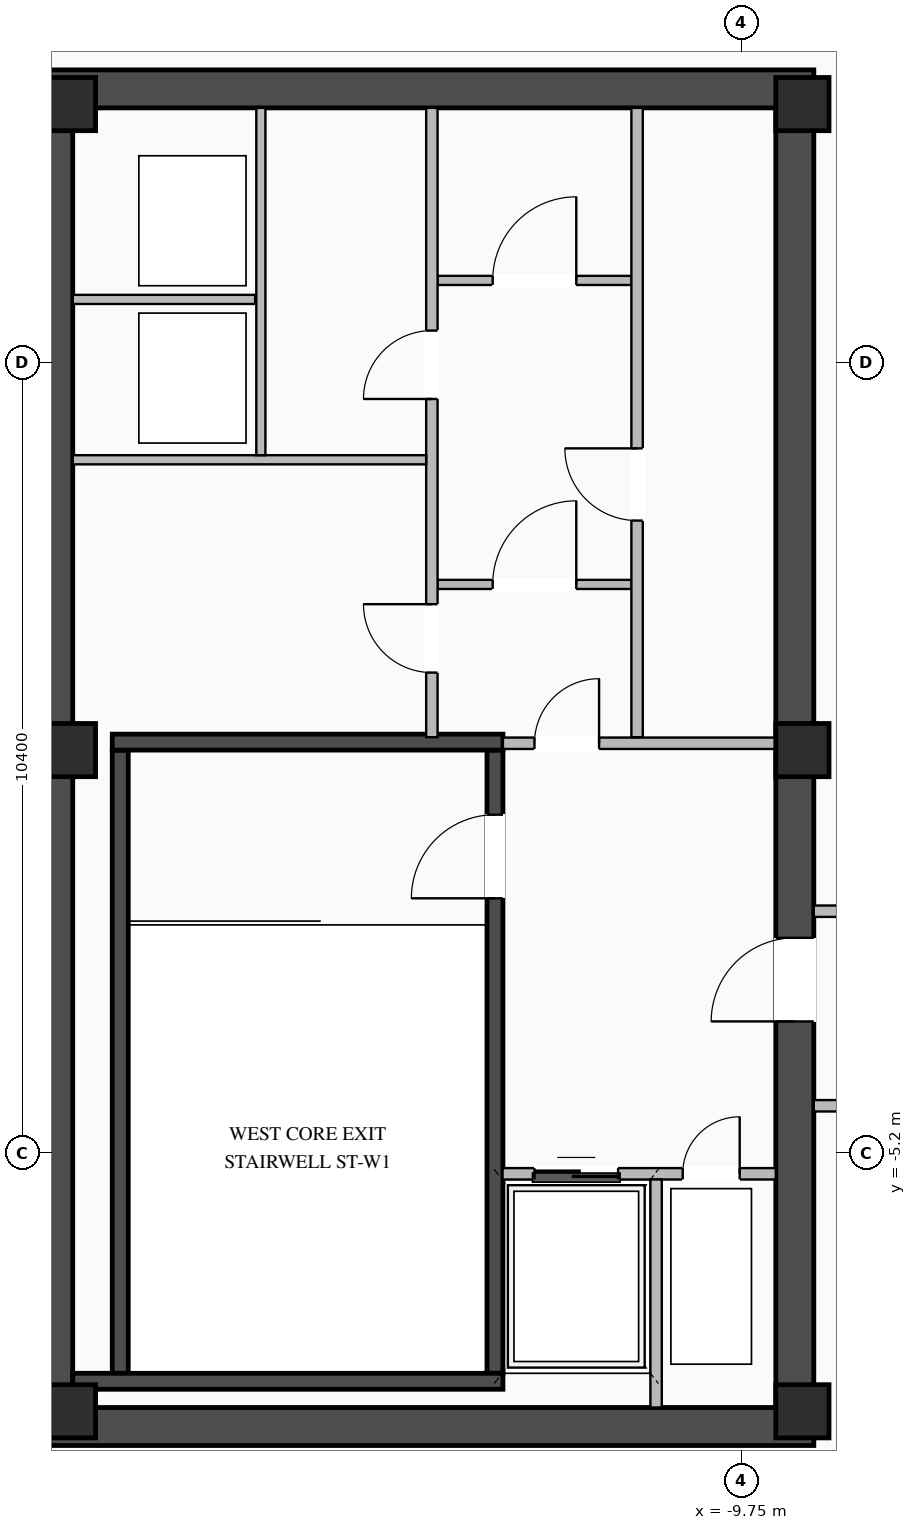
"""IFC4 building model, lengths in metres.
Left out: names, types, materials, properties, quantities, classifications, styles, units other than length and angle.
Written with IfcOpenShell. Run it as: python <this file> out.ifc"""

import sys

from ifc_helpers import new_model, si_unit, direction, frame, frame_2d, origin, origin_2d, place, context, subcontext, project, spatial, rectangle, extrude, element, fill, save


model = new_model("IFC4")
c1 = context("Model", 3, precision=1e-05, world=origin(), true_north=direction((0.0, 1.0)))
c2 = subcontext(c1, "Body", "Model", "MODEL_VIEW")
j1 = project(units=[si_unit("LENGTHUNIT", "METRE"), si_unit("PLANEANGLEUNIT", "RADIAN")], contexts=[c1])
p1 = place(None, origin())
s1 = spatial("IfcSite", under=j1, at=p1, CompositionType="ELEMENT")
p2 = place(p1, origin())
s2 = spatial("IfcBuilding", under=s1, at=p2, CompositionType="ELEMENT")
p3 = place(p2, frame((0.0, 0.0, 308.55)))
s3 = spatial("IfcBuildingStorey", under=s2, at=p3, CompositionType="ELEMENT", Elevation=308.55)
for number, where, z_axis, x_axis in (
    (1, (-19.05, -8.8, 0.0), (0.0, 0.0, 1.0), (1.0, 0.0, 0.0)),
    (2, (-19.05, 8.8, 0.0), (0.0, 0.0, 1.0), (1.0, 0.0, 0.0)),
):
    element("IfcWall", number, at=place(p3, frame(where, z_axis=z_axis, x_axis=x_axis)), inside=s3, PredefinedType="SHEAR", context=c2, shape_type="SweptSolid", body=[
        extrude(rectangle(XDim=10.25, YDim=0.5, at=frame_2d((5.125, 0.0))), origin(), (0.0, 0.0, 1.0), 3.71),
    ])
p4 = place(p3, frame((-18.8, -8.55, 0.0), z_axis=(0.0, 0.0, 1.0), x_axis=(0.0, 1.0, 0.0)))
e3 = element("IfcWall", 3, at=p4, inside=s3, PredefinedType="SHEAR", context=c2, shape_type="SweptSolid", body=[
    extrude(rectangle(XDim=17.1, YDim=0.5, at=frame_2d((8.55, 0.0))), origin(), (0.0, 0.0, 1.0), 3.71),
])
p5 = place(p3, frame((-9.05, -8.55, 0.0), z_axis=(0.0, 0.0, 1.0), x_axis=(0.0, 1.0, 0.0)))
e4 = element("IfcWall", 4, at=p5, inside=s3, PredefinedType="SHEAR", context=c2, shape_type="SweptSolid", body=[
    extrude(rectangle(XDim=17.1, YDim=0.5, at=frame_2d((8.55, 0.0))), origin(), (0.0, 0.0, 1.0), 3.71),
])
p6 = place(p5, frame((5.08, 0.0, 0.0)))
e5 = element("IfcOpeningElement", 5, at=p6, cuts=e4, PredefinedType="OPENING", context=c2, shape_type="SweptSolid", body=[
    extrude(rectangle(XDim=1.1, YDim=2.08, at=frame_2d((0.55, 1.04))), frame((0.0, 0.26, 0.0), z_axis=(0.0, -1.0, 0.0), x_axis=(1.0, 0.0, 0.0)), (0.0, 0.0, 1.0), 0.52),
])
p7 = place(p3, frame((-12.995, -8.1, 0.0), z_axis=(0.0, 0.0, 1.0), x_axis=(0.0, 1.0, 0.0)))
e6 = element("IfcWall", 6, at=p7, inside=s3, PredefinedType="SHEAR", context=c2, shape_type="SweptSolid", body=[
    extrude(rectangle(XDim=8.2, YDim=0.21, at=frame_2d((4.1, 0.0))), origin(), (0.0, 0.0, 1.0), 3.71),
])
p8 = place(p7, frame((6.25, 0.0, 0.0)))
e7 = element("IfcOpeningElement", 7, at=p8, cuts=e6, PredefinedType="OPENING", context=c2, shape_type="SweptSolid", body=[
    extrude(rectangle(XDim=1.1, YDim=2.15, at=frame_2d((0.55, 1.075))), frame((0.0, 0.115, 0.0), z_axis=(0.0, -1.0, 0.0), x_axis=(1.0, 0.0, 0.0)), (0.0, 0.0, 1.0), 0.23),
])
p9 = place(p3, frame((-17.925, -8.1, 0.0), z_axis=(0.0, 0.0, 1.0), x_axis=(0.0, 1.0, 0.0)))
e8 = element("IfcWall", 8, at=p9, inside=s3, PredefinedType="SHEAR", context=c2, shape_type="SweptSolid", body=[
    extrude(rectangle(XDim=8.2, YDim=0.21, at=frame_2d((4.1, 0.0))), origin(), (0.0, 0.0, 1.0), 3.71),
])
p10 = place(p3, frame((-18.55, -8.205, 0.0), z_axis=(0.0, 0.0, 1.0), x_axis=(1.0, 0.0, 0.0)))
e9 = element("IfcWall", 9, at=p10, inside=s3, PredefinedType="SHEAR", context=c2, shape_type="SweptSolid", body=[
    extrude(rectangle(XDim=5.66, YDim=0.21, at=frame_2d((2.83, 0.0))), origin(), (0.0, 0.0, 1.0), 3.71),
])
p11 = place(p3, frame((-12.89, 0.205, 0.0), z_axis=(0.0, 0.0, 1.0), x_axis=(-1.0, 0.0, 0.0)))
e10 = element("IfcWall", 10, at=p11, inside=s3, PredefinedType="SHEAR", context=c2, shape_type="SweptSolid", body=[
    extrude(rectangle(XDim=5.14, YDim=0.21, at=frame_2d((2.57, 0.0))), origin(), (0.0, 0.0, 1.0), 3.71),
])
for number, where, z_axis, x_axis in (
    (11, (-8.95, -8.6, 0.0), (0.0, 0.0, 1.0), (1.0, 0.0, 0.0)),
    (12, (-8.95, 0.1, 0.0), (0.0, 0.0, 1.0), (1.0, 0.0, 0.0)),
    (13, (-8.95, 8.6, 0.0), (0.0, 0.0, 1.0), (1.0, 0.0, 0.0)),
    (14, (-18.6, -8.6, 0.0), (0.0, 0.0, 1.0), (1.0, 0.0, 0.0)),
    (15, (-18.6, 0.1, 0.0), (0.0, 0.0, 1.0), (1.0, 0.0, 0.0)),
    (16, (-18.6, 8.6, 0.0), (0.0, 0.0, 1.0), (1.0, 0.0, 0.0)),
):
    element("IfcColumn", number, at=place(p3, frame(where, z_axis=z_axis, x_axis=x_axis)), inside=s3, PredefinedType="COLUMN", context=c2, shape_type="SweptSolid", body=[
        extrude(rectangle(XDim=0.7, YDim=0.7, at=origin_2d()), origin(), (0.0, 0.0, 1.0), 3.95),
    ])
p12 = place(p3, frame((-12.895, -5.475, 0.0), z_axis=(0.0, 0.0, 1.0), x_axis=(1.0, 0.0, 0.0)))
e17 = element("IfcWall", 17, at=p12, inside=s3, PredefinedType="STANDARD", context=c2, shape_type="SweptSolid", body=[
    extrude(rectangle(XDim=3.595, YDim=0.15, at=frame_2d((1.797, 0.0))), origin(), (0.0, 0.0, 1.0), 3.69),
])
p13 = place(p12, frame((0.42, 0.0, 0.0)))
e18 = element("IfcOpeningElement", 18, at=p13, cuts=e17, PredefinedType="OPENING", context=c2, shape_type="SweptSolid", body=[
    extrude(rectangle(XDim=1.1, YDim=2.15, at=frame_2d((0.55, 1.075))), frame((0.0, 0.085, 0.0), z_axis=(0.0, -1.0, 0.0), x_axis=(1.0, 0.0, 0.0)), (0.0, 0.0, 1.0), 0.17),
])
p14 = place(p12, frame((2.37, 0.0, 0.0)))
e19 = element("IfcOpeningElement", 19, at=p14, cuts=e17, PredefinedType="OPENING", context=c2, shape_type="SweptSolid", body=[
    extrude(rectangle(XDim=0.75, YDim=2.05, at=frame_2d((0.375, 1.025))), frame((0.0, 0.085, 0.0), z_axis=(0.0, -1.0, 0.0), x_axis=(1.0, 0.0, 0.0)), (0.0, 0.0, 1.0), 0.17),
])
p15 = place(p3, frame((-10.875, -8.55, 0.0), z_axis=(0.0, 0.0, 1.0), x_axis=(0.0, 1.0, 0.0)))
e20 = element("IfcWall", 20, at=p15, inside=s3, PredefinedType="STANDARD", context=c2, shape_type="SweptSolid", body=[
    extrude(rectangle(XDim=3.0, YDim=0.15, at=frame_2d((1.5, 0.0))), origin(), (0.0, 0.0, 1.0), 3.69),
])
p16 = place(p3, frame((-12.89, 0.19, 0.0), z_axis=(0.0, 0.0, 1.0), x_axis=(1.0, 0.0, 0.0)))
e21 = element("IfcWall", 21, at=p16, inside=s3, PredefinedType="STANDARD", context=c2, shape_type="SweptSolid", body=[
    extrude(rectangle(XDim=3.59, YDim=0.15, at=frame_2d((1.795, 0.0))), origin(), (0.0, 0.0, 1.0), 3.185),
])
p17 = place(p16, frame((0.415, 0.0, 0.0)))
e22 = element("IfcOpeningElement", 22, at=p17, cuts=e21, PredefinedType="OPENING", context=c2, shape_type="SweptSolid", body=[
    extrude(rectangle(XDim=0.85, YDim=2.04, at=frame_2d((0.425, 1.02))), frame((0.0, 0.085, 0.0), z_axis=(0.0, -1.0, 0.0), x_axis=(1.0, 0.0, 0.0)), (0.0, 0.0, 1.0), 0.17),
])
p18 = place(p3, frame((-13.75, 2.28, 0.0), z_axis=(0.0, 0.0, 1.0), x_axis=(1.0, 0.0, 0.0)))
e23 = element("IfcWall", 23, at=p18, inside=s3, PredefinedType="STANDARD", context=c2, shape_type="SweptSolid", body=[
    extrude(rectangle(XDim=2.55, YDim=0.12, at=frame_2d((1.275, 0.0))), origin(), (0.0, 0.0, 1.0), 3.69),
])
p19 = place(p18, frame((0.725, 0.0, 0.0)))
e24 = element("IfcOpeningElement", 24, at=p19, cuts=e23, PredefinedType="OPENING", context=c2, shape_type="SweptSolid", body=[
    extrude(rectangle(XDim=1.1, YDim=2.1, at=frame_2d((0.55, 1.05))), frame((0.0, 0.07, 0.0), z_axis=(0.0, -1.0, 0.0), x_axis=(1.0, 0.0, 0.0)), (0.0, 0.0, 1.0), 0.14),
])
p20 = place(p3, frame((-13.75, 6.28, 0.0), z_axis=(0.0, 0.0, 1.0), x_axis=(1.0, 0.0, 0.0)))
e25 = element("IfcWall", 25, at=p20, inside=s3, PredefinedType="STANDARD", context=c2, shape_type="SweptSolid", body=[
    extrude(rectangle(XDim=2.55, YDim=0.12, at=frame_2d((1.275, 0.0))), origin(), (0.0, 0.0, 1.0), 3.69),
])
p21 = place(p20, frame((0.725, 0.0, 0.0)))
e26 = element("IfcOpeningElement", 26, at=p21, cuts=e25, PredefinedType="OPENING", context=c2, shape_type="SweptSolid", body=[
    extrude(rectangle(XDim=1.1, YDim=2.1, at=frame_2d((0.55, 1.05))), frame((0.0, 0.07, 0.0), z_axis=(0.0, -1.0, 0.0), x_axis=(1.0, 0.0, 0.0)), (0.0, 0.0, 1.0), 0.14),
])
p22 = place(p3, frame((-11.125, 0.27, 0.0), z_axis=(0.0, 0.0, 1.0), x_axis=(0.0, 1.0, 0.0)))
e27 = element("IfcWall", 27, at=p22, inside=s3, PredefinedType="STANDARD", context=c2, shape_type="SweptSolid", body=[
    extrude(rectangle(XDim=8.28, YDim=0.15, at=frame_2d((4.14, 0.0))), origin(), (0.0, 0.0, 1.0), 3.69),
])
p23 = place(p22, frame((2.85, 0.0, 0.0)))
e28 = element("IfcOpeningElement", 28, at=p23, cuts=e27, PredefinedType="OPENING", context=c2, shape_type="SweptSolid", body=[
    extrude(rectangle(XDim=0.95, YDim=2.05, at=frame_2d((0.475, 1.025))), frame((0.0, 0.085, 0.0), z_axis=(0.0, -1.0, 0.0), x_axis=(1.0, 0.0, 0.0)), (0.0, 0.0, 1.0), 0.17),
])
p24 = place(p3, frame((-13.825, 0.27, 0.0), z_axis=(0.0, 0.0, 1.0), x_axis=(0.0, 1.0, 0.0)))
e29 = element("IfcWall", 29, at=p24, inside=s3, PredefinedType="STANDARD", context=c2, shape_type="SweptSolid", body=[
    extrude(rectangle(XDim=8.28, YDim=0.15, at=frame_2d((4.14, 0.0))), origin(), (0.0, 0.0, 1.0), 3.69),
])
p25 = place(p24, frame((4.45, 0.0, 0.0)))
e30 = element("IfcOpeningElement", 30, at=p25, cuts=e29, PredefinedType="OPENING", context=c2, shape_type="SweptSolid", body=[
    extrude(rectangle(XDim=0.9, YDim=2.05, at=frame_2d((0.45, 1.025))), frame((0.0, 0.085, 0.0), z_axis=(0.0, -1.0, 0.0), x_axis=(1.0, 0.0, 0.0)), (0.0, 0.0, 1.0), 0.17),
])
p26 = place(p24, frame((0.85, 0.0, 0.0)))
e31 = element("IfcOpeningElement", 31, at=p26, cuts=e29, PredefinedType="OPENING", context=c2, shape_type="SweptSolid", body=[
    extrude(rectangle(XDim=0.9, YDim=2.05, at=frame_2d((0.45, 1.025))), frame((0.0, 0.085, 0.0), z_axis=(0.0, -1.0, 0.0), x_axis=(1.0, 0.0, 0.0)), (0.0, 0.0, 1.0), 0.17),
])
p27 = place(p3, frame((-18.55, 3.92, 0.0), z_axis=(0.0, 0.0, 1.0), x_axis=(1.0, 0.0, 0.0)))
e32 = element("IfcWall", 32, at=p27, inside=s3, PredefinedType="STANDARD", context=c2, shape_type="SweptSolid", body=[
    extrude(rectangle(XDim=4.65, YDim=0.12, at=frame_2d((2.325, 0.0))), origin(), (0.0, 0.0, 1.0), 3.69),
])
p28 = place(p3, frame((-18.55, 6.03, 0.0), z_axis=(0.0, 0.0, 1.0), x_axis=(1.0, 0.0, 0.0)))
e33 = element("IfcWall", 33, at=p28, inside=s3, PredefinedType="STANDARD", context=c2, shape_type="SweptSolid", body=[
    extrude(rectangle(XDim=2.4, YDim=0.12, at=frame_2d((1.2, 0.0))), origin(), (0.0, 0.0, 1.0), 3.69),
])
p29 = place(p3, frame((-16.075, 3.98, 0.0), z_axis=(0.0, 0.0, 1.0), x_axis=(0.0, 1.0, 0.0)))
e34 = element("IfcWall", 34, at=p29, inside=s3, PredefinedType="STANDARD", context=c2, shape_type="SweptSolid", body=[
    extrude(rectangle(XDim=4.57, YDim=0.12, at=frame_2d((2.285, 0.0))), origin(), (0.0, 0.0, 1.0), 3.69),
])
p30 = place(p3, frame((-8.8, -2.02, 0.0), z_axis=(0.0, 0.0, 1.0), x_axis=(1.0, 0.0, 0.0)))
e35 = element("IfcWall", 35, at=p30, inside=s3, PredefinedType="STANDARD", context=c2, shape_type="SweptSolid", body=[
    extrude(rectangle(XDim=17.6, YDim=0.15, at=frame_2d((8.8, 0.0))), origin(), (0.0, 0.0, 1.0), 3.69),
])
p31 = place(p30, frame((4.6, 0.0, 0.0)))
e36 = element("IfcOpeningElement", 36, at=p31, cuts=e35, PredefinedType="OPENING", context=c2, shape_type="SweptSolid", body=[
    extrude(rectangle(XDim=1.0, YDim=2.02, at=frame_2d((0.5, 1.01))), frame((0.0, 0.085, 0.0), z_axis=(0.0, -1.0, 0.0), x_axis=(1.0, 0.0, 0.0)), (0.0, 0.0, 1.0), 0.17),
])
p32 = place(p30, frame((13.4, 0.0, 0.0)))
e37 = element("IfcOpeningElement", 37, at=p32, cuts=e35, PredefinedType="OPENING", context=c2, shape_type="SweptSolid", body=[
    extrude(rectangle(XDim=1.0, YDim=2.02, at=frame_2d((0.5, 1.01))), frame((0.0, 0.085, 0.0), z_axis=(0.0, -1.0, 0.0), x_axis=(1.0, 0.0, 0.0)), (0.0, 0.0, 1.0), 0.17),
])
p33 = place(p3, frame((-8.8, -4.58, 0.0), z_axis=(0.0, 0.0, 1.0), x_axis=(1.0, 0.0, 0.0)))
e38 = element("IfcWall", 38, at=p33, inside=s3, PredefinedType="STANDARD", context=c2, shape_type="SweptSolid", body=[
    extrude(rectangle(XDim=17.6, YDim=0.15, at=frame_2d((8.8, 0.0))), origin(), (0.0, 0.0, 1.0), 3.69),
])
p34 = place(p33, frame((4.6, 0.0, 0.0)))
e39 = element("IfcOpeningElement", 39, at=p34, cuts=e38, PredefinedType="OPENING", context=c2, shape_type="SweptSolid", body=[
    extrude(rectangle(XDim=1.0, YDim=2.02, at=frame_2d((0.5, 1.01))), frame((0.0, 0.085, 0.0), z_axis=(0.0, -1.0, 0.0), x_axis=(1.0, 0.0, 0.0)), (0.0, 0.0, 1.0), 0.17),
])
p35 = place(p8, origin())
e40 = element("IfcDoor", 40, at=p35, inside=s3, OperationType="SINGLE_SWING_LEFT", PredefinedType="DOOR", context=c2, shape_type="SweptSolid", body=[
    extrude(rectangle(XDim=1.1, YDim=2.15, at=frame_2d((0.55, 1.075))), frame((0.0, 0.025, 0.0), z_axis=(0.0, -1.0, 0.0), x_axis=(1.0, 0.0, 0.0)), (0.0, 0.0, 1.0), 0.05),
])
fill(e7, e40)
p36 = place(p13, origin())
e41 = element("IfcDoor", 41, at=p36, inside=s3, OperationType="DOUBLE_DOOR_SLIDING", PredefinedType="DOOR", context=c2, shape_type="SweptSolid", body=[
    extrude(rectangle(XDim=1.1, YDim=2.15, at=frame_2d((0.55, 1.075))), frame((0.0, 0.025, 0.0), z_axis=(0.0, -1.0, 0.0), x_axis=(1.0, 0.0, 0.0)), (0.0, 0.0, 1.0), 0.05),
])
fill(e18, e41)
p37 = place(p14, origin())
e42 = element("IfcDoor", 42, at=p37, inside=s3, OperationType="SINGLE_SWING_RIGHT", PredefinedType="DOOR", context=c2, shape_type="SweptSolid", body=[
    extrude(rectangle(XDim=0.75, YDim=2.05, at=frame_2d((0.375, 1.025))), frame((0.0, 0.025, 0.0), z_axis=(0.0, -1.0, 0.0), x_axis=(1.0, 0.0, 0.0)), (0.0, 0.0, 1.0), 0.05),
])
fill(e19, e42)
p38 = place(p17, origin())
e43 = element("IfcDoor", 43, at=p38, inside=s3, OperationType="SINGLE_SWING_RIGHT", PredefinedType="DOOR", context=c2, shape_type="SweptSolid", body=[
    extrude(rectangle(XDim=0.85, YDim=2.04, at=frame_2d((0.425, 1.02))), frame((0.0, 0.025, 0.0), z_axis=(0.0, -1.0, 0.0), x_axis=(1.0, 0.0, 0.0)), (0.0, 0.0, 1.0), 0.05),
])
fill(e22, e43)
p39 = place(p6, origin())
e44 = element("IfcDoor", 44, at=p39, inside=s3, OperationType="SINGLE_SWING_LEFT", PredefinedType="DOOR", context=c2, shape_type="SweptSolid", body=[
    extrude(rectangle(XDim=1.1, YDim=2.08, at=frame_2d((0.55, 1.04))), frame((0.0, 0.205, 0.0), z_axis=(0.0, -1.0, 0.0), x_axis=(1.0, 0.0, 0.0)), (0.0, 0.0, 1.0), 0.05),
])
fill(e5, e44)
p40 = place(p19, origin())
e45 = element("IfcDoor", 45, at=p40, inside=s3, OperationType="SINGLE_SWING_RIGHT", PredefinedType="DOOR", context=c2, shape_type="SweptSolid", body=[
    extrude(rectangle(XDim=1.1, YDim=2.1, at=frame_2d((0.55, 1.05))), frame((0.0, 0.025, 0.0), z_axis=(0.0, -1.0, 0.0), x_axis=(1.0, 0.0, 0.0)), (0.0, 0.0, 1.0), 0.05),
])
fill(e24, e45)
p41 = place(p21, origin())
e46 = element("IfcDoor", 46, at=p41, inside=s3, OperationType="SINGLE_SWING_RIGHT", PredefinedType="DOOR", context=c2, shape_type="SweptSolid", body=[
    extrude(rectangle(XDim=1.1, YDim=2.1, at=frame_2d((0.55, 1.05))), frame((0.0, 0.025, 0.0), z_axis=(0.0, -1.0, 0.0), x_axis=(1.0, 0.0, 0.0)), (0.0, 0.0, 1.0), 0.05),
])
fill(e26, e46)
p42 = place(p23, origin())
e47 = element("IfcDoor", 47, at=p42, inside=s3, OperationType="SINGLE_SWING_RIGHT", PredefinedType="DOOR", context=c2, shape_type="SweptSolid", body=[
    extrude(rectangle(XDim=0.95, YDim=2.05, at=frame_2d((0.475, 1.025))), frame((0.0, 0.025, 0.0), z_axis=(0.0, -1.0, 0.0), x_axis=(1.0, 0.0, 0.0)), (0.0, 0.0, 1.0), 0.05),
])
fill(e28, e47)
p43 = place(p25, origin())
e48 = element("IfcDoor", 48, at=p43, inside=s3, OperationType="SINGLE_SWING_LEFT", PredefinedType="DOOR", context=c2, shape_type="SweptSolid", body=[
    extrude(rectangle(XDim=0.9, YDim=2.05, at=frame_2d((0.45, 1.025))), frame((0.0, 0.025, 0.0), z_axis=(0.0, -1.0, 0.0), x_axis=(1.0, 0.0, 0.0)), (0.0, 0.0, 1.0), 0.05),
])
fill(e30, e48)
p44 = place(p26, origin())
e49 = element("IfcDoor", 49, at=p44, inside=s3, OperationType="SINGLE_SWING_RIGHT", PredefinedType="DOOR", context=c2, shape_type="SweptSolid", body=[
    extrude(rectangle(XDim=0.9, YDim=2.05, at=frame_2d((0.45, 1.025))), frame((0.0, 0.025, 0.0), z_axis=(0.0, -1.0, 0.0), x_axis=(1.0, 0.0, 0.0)), (0.0, 0.0, 1.0), 0.05),
])
fill(e31, e49)
save(model, sys.argv[1])
